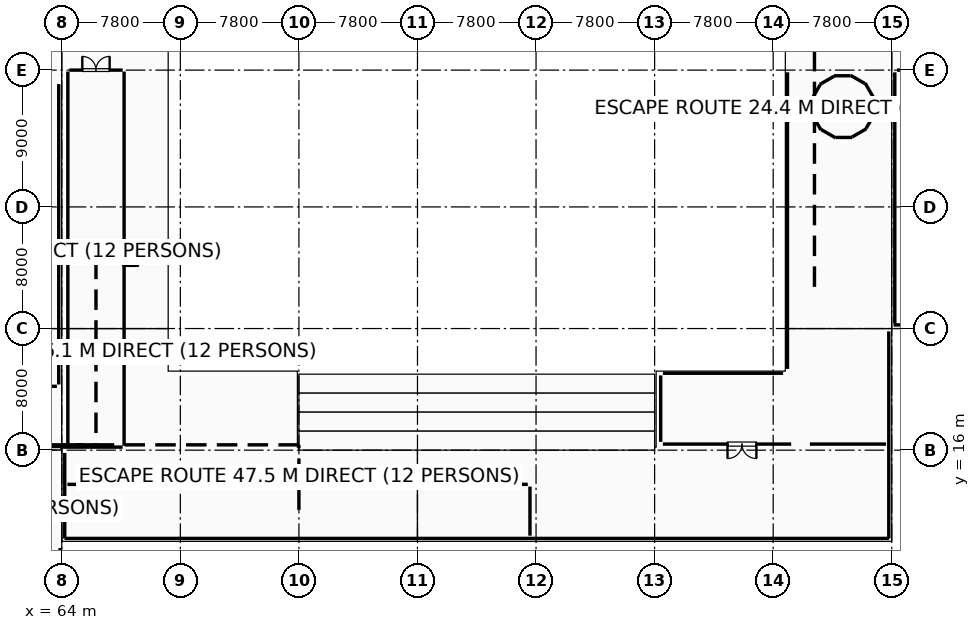
"""IFC4 building model, lengths in metres.
Left out: names, types, materials, properties, quantities, classifications, styles, units other than length and angle.
Written with IfcOpenShell. Run it as: python <this file> out.ifc"""

import sys

from ifc_helpers import new_model, si_unit, direction, frame, frame_2d, origin, origin_2d, place, context, subcontext, project, spatial, rectangle, extrude, element, fill, save


model = new_model("IFC4")
c1 = context("Model", 3, precision=1e-05, world=origin(), true_north=direction((0.0, 1.0)))
c2 = subcontext(c1, "Body", "Model", "MODEL_VIEW")
j1 = project(units=[si_unit("LENGTHUNIT", "METRE"), si_unit("PLANEANGLEUNIT", "RADIAN")], contexts=[c1])
p1 = place(None, origin())
s1 = spatial("IfcSite", under=j1, at=p1, CompositionType="ELEMENT")
p2 = place(p1, origin())
s2 = spatial("IfcBuilding", under=s1, at=p2, CompositionType="ELEMENT")
p3 = place(p2, frame((0.0, 0.0, 15.0)))
s3 = spatial("IfcBuildingStorey", under=s2, at=p3, CompositionType="ELEMENT", Elevation=15.0)
for number, where, z_axis, x_axis in (
    (1, (70.0, 16.0, 0.0), (0.0, 0.0, 1.0), (1.0, 0.0, 0.0)),
    (2, (70.0, 41.0, 0.0), (0.0, 0.0, 1.0), (1.0, 0.0, 0.0)),
):
    element("IfcColumn", number, at=place(p3, frame(where, z_axis=z_axis, x_axis=x_axis)), inside=s3, PredefinedType="COLUMN", context=c2, shape_type="SweptSolid", body=[
        extrude(rectangle(XDim=1.2, YDim=1.2, at=origin_2d()), origin(), (0.0, 0.0, 1.0), 4.8),
    ])
for number, where, z_axis, x_axis in (
    (3, (79.6, 16.0, 0.0), (0.0, 0.0, 1.0), (1.0, 0.0, 0.0)),
    (4, (79.6, 41.0, 0.0), (0.0, 0.0, 1.0), (1.0, 0.0, 0.0)),
    (5, (87.4, 16.0, 0.0), (0.0, 0.0, 1.0), (1.0, 0.0, 0.0)),
    (6, (87.4, 41.0, 0.0), (0.0, 0.0, 1.0), (1.0, 0.0, 0.0)),
    (7, (95.2, 16.0, 0.0), (0.0, 0.0, 1.0), (1.0, 0.0, 0.0)),
    (8, (95.2, 41.0, 0.0), (0.0, 0.0, 1.0), (1.0, 0.0, 0.0)),
    (9, (103.0, 16.0, 0.0), (0.0, 0.0, 1.0), (1.0, 0.0, 0.0)),
    (10, (103.0, 41.0, 0.0), (0.0, 0.0, 1.0), (1.0, 0.0, 0.0)),
):
    element("IfcColumn", number, at=place(p3, frame(where, z_axis=z_axis, x_axis=x_axis)), inside=s3, PredefinedType="COLUMN", context=c2, shape_type="SweptSolid", body=[
        extrude(rectangle(XDim=1.05, YDim=1.05, at=origin_2d()), origin(), (0.0, 0.0, 1.0), 4.8),
    ])
for number, where, z_axis, x_axis in (
    (11, (112.6, 16.0, 0.0), (0.0, 0.0, 1.0), (1.0, 0.0, 0.0)),
    (12, (112.6, 41.0, 0.0), (0.0, 0.0, 1.0), (1.0, 0.0, 0.0)),
):
    element("IfcColumn", number, at=place(p3, frame(where, z_axis=z_axis, x_axis=x_axis)), inside=s3, PredefinedType="COLUMN", context=c2, shape_type="SweptSolid", body=[
        extrude(rectangle(XDim=1.2, YDim=1.2, at=origin_2d()), origin(), (0.0, 0.0, 1.0), 4.8),
    ])
p4 = place(p3, frame((126.015, 24.24, 0.0), z_axis=(0.0, 0.0, 1.0), x_axis=(-1.0, 0.0, 0.0)))
e13 = element("IfcWall", 13, at=p4, inside=s3, PredefinedType="PARAPET", context=c2, shape_type="SweptSolid", body=[
    extrude(rectangle(XDim=7.295, YDim=0.18, at=frame_2d((3.647, 0.0))), origin(), (0.0, 0.0, 1.0), 0.88),
])
p5 = place(p3, frame((118.405, 23.815, 0.0), z_axis=(0.0, 0.0, 1.0), x_axis=(0.0, -1.0, 0.0)))
e14 = element("IfcWall", 14, at=p5, inside=s3, PredefinedType="STANDARD", context=c2, shape_type="SweptSolid", body=[
    extrude(rectangle(XDim=13.63, YDim=0.35, at=frame_2d((6.815, 0.0))), origin(), (0.0, 0.0, 1.0), 3.735),
])
p6 = place(p3, frame((118.415, 10.195, 0.0), z_axis=(0.0, 0.0, 1.0), x_axis=(-1.0, 0.0, 0.0)))
e15 = element("IfcWall", 15, at=p6, inside=s3, PredefinedType="STANDARD", context=c2, shape_type="SweptSolid", body=[
    extrude(rectangle(XDim=54.23, YDim=0.35, at=frame_2d((27.115, 0.0))), origin(), (0.0, 0.0, 1.0), 3.735),
])
p7 = place(p3, frame((64.195, 10.185, 0.0), z_axis=(0.0, 0.0, 1.0), x_axis=(0.0, 1.0, 0.0)))
e16 = element("IfcWall", 16, at=p7, inside=s3, PredefinedType="STANDARD", context=c2, shape_type="SweptSolid", body=[
    extrude(rectangle(XDim=5.63, YDim=0.35, at=frame_2d((2.815, 0.0))), origin(), (0.0, 0.0, 1.0), 3.735),
])
p8 = place(p3, frame((63.88, 16.24, 0.0), z_axis=(0.0, 0.0, 1.0), x_axis=(-1.0, 0.0, 0.0)))
e17 = element("IfcWall", 17, at=p8, inside=s3, PredefinedType="PARAPET", context=c2, shape_type="SweptSolid", body=[
    extrude(rectangle(XDim=7.495, YDim=0.18, at=frame_2d((3.748, 0.0))), origin(), (0.0, 0.0, 1.0), 0.88),
])
p9 = place(p3, frame((63.89, 9.564, 0.0), z_axis=(0.0, 0.0, 1.0), x_axis=(0.0, -1.0, 0.0)))
e18 = element("IfcWall", 18, at=p9, inside=s3, PredefinedType="PARAPET", context=c2, shape_type="SweptSolid", body=[
    extrude(rectangle(XDim=1.434, YDim=0.18, at=frame_2d((0.717, 0.0))), origin(), (0.0, 0.0, 1.0), 1.15),
])
p10 = place(p3, frame((117.461, 39.086, 0.0), z_axis=(0.0, 0.0, 1.0), x_axis=(-0.500080723117, 0.865978793255, 0.0)))
e19 = element("IfcWall", 19, at=p10, inside=s3, PredefinedType="SHEAR", context=c2, shape_type="SweptSolid", body=[
    extrude(rectangle(XDim=1.219, YDim=0.35, at=frame_2d((0.609, 0.0))), origin(), (0.0, 0.0, 1.0), 4.55),
])
for number, where, z_axis, x_axis in (
    (20, (116.833, 40.115, 0.0), (0.0, 0.0, 1.0), (-0.866, 0.5, 0.0)),
    (21, (115.884, 40.628, 0.0), (0.0, 0.0, 1.0), (-1.0, 0.0, 0.0)),
    (22, (114.804, 40.598, 0.0), (0.0, 0.0, 1.0), (-0.866, -0.5, 0.0)),
    (23, (113.885, 40.033, 0.0), (0.0, 0.0, 1.0), (-0.5, -0.866, 0.0)),
    (24, (113.372, 39.083, 0.0), (0.0, 0.0, 1.0), (0.0, -1.0, 0.0)),
    (25, (113.402, 38.004, 0.0), (0.0, 0.0, 1.0), (0.5, -0.866, 0.0)),
    (26, (113.967, 37.085, 0.0), (0.0, 0.0, 1.0), (0.866, -0.5, 0.0)),
    (27, (114.917, 36.572, 0.0), (0.0, 0.0, 1.0), (1.0, 0.0, 0.0)),
    (28, (115.996, 36.602, 0.0), (0.0, 0.0, 1.0), (0.866, 0.5, 0.0)),
    (29, (116.915, 37.167, 0.0), (0.0, 0.0, 1.0), (0.5, 0.866, 0.0)),
):
    element("IfcWall", number, at=place(p3, frame(where, z_axis=z_axis, x_axis=x_axis)), inside=s3, PredefinedType="SHEAR", context=c2, shape_type="SweptSolid", body=[
        extrude(rectangle(XDim=1.093, YDim=0.35, at=frame_2d((0.546, 0.0))), origin(), (0.0, 0.0, 1.0), 4.55),
    ])
p11 = place(p3, frame((117.428, 38.116, 0.0), z_axis=(0.0, 0.0, 1.0), x_axis=(0.0, 1.0, 0.0)))
e30 = element("IfcWall", 30, at=p11, inside=s3, PredefinedType="SHEAR", context=c2, shape_type="SweptSolid", body=[
    extrude(rectangle(XDim=0.967, YDim=0.35, at=frame_2d((0.483, 0.0))), origin(), (0.0, 0.0, 1.0), 4.55),
])
p12 = place(p3, frame((118.226, 16.4, 0.0), z_axis=(0.0, 0.0, 1.0), x_axis=(-1.0, 0.0, 0.0)))
e31 = element("IfcWall", 31, at=p12, inside=s3, PredefinedType="PARTITIONING", context=c2, shape_type="SweptSolid", body=[
    extrude(rectangle(XDim=5.011, YDim=0.25, at=frame_2d((2.505, 0.0))), origin(), (0.0, 0.0, 1.0), 4.54),
])
p13 = place(p3, frame((111.985, 16.4, 0.0), z_axis=(0.0, 0.0, 1.0), x_axis=(-1.0, 0.0, 0.0)))
e32 = element("IfcWall", 32, at=p13, inside=s3, PredefinedType="PARTITIONING", context=c2, shape_type="SweptSolid", body=[
    extrude(rectangle(XDim=8.44, YDim=0.25, at=frame_2d((4.22, 0.0))), origin(), (0.0, 0.0, 1.0), 3.68),
])
p14 = place(p13, frame((2.289, 0.0, 0.0)))
e33 = element("IfcOpeningElement", 33, at=p14, cuts=e32, PredefinedType="OPENING", context=c2, shape_type="SweptSolid", body=[
    extrude(rectangle(XDim=1.9, YDim=2.35, at=frame_2d((0.95, 1.175))), frame((0.0, 0.135, 0.0), z_axis=(0.0, -1.0, 0.0), x_axis=(1.0, 0.0, 0.0)), (0.0, 0.0, 1.0), 0.27),
])
p15 = place(p3, frame((103.4, 16.545, 0.0), z_axis=(0.0, 0.0, 1.0), x_axis=(0.0, 1.0, 0.0)))
e34 = element("IfcWall", 34, at=p15, inside=s3, PredefinedType="PARTITIONING", context=c2, shape_type="SweptSolid", body=[
    extrude(rectangle(XDim=4.37, YDim=0.25, at=frame_2d((2.185, 0.0))), origin(), (0.0, 0.0, 1.0), 4.54),
])
p16 = place(p3, frame((103.545, 21.06, 0.0), z_axis=(0.0, 0.0, 1.0), x_axis=(1.0, 0.0, 0.0)))
e35 = element("IfcWall", 35, at=p16, inside=s3, PredefinedType="PARTITIONING", context=c2, shape_type="SweptSolid", body=[
    extrude(rectangle(XDim=7.91, YDim=0.25, at=frame_2d((3.955, 0.0))), origin(), (0.0, 0.0, 1.0), 4.54),
])
p17 = place(p3, frame((111.74, 21.345, 0.0), z_axis=(0.0, 0.0, 1.0), x_axis=(0.0, 1.0, 0.0)))
e36 = element("IfcWall", 36, at=p17, inside=s3, PredefinedType="PARTITIONING", context=c2, shape_type="SweptSolid", body=[
    extrude(rectangle(XDim=19.51, YDim=0.25, at=frame_2d((9.755, 0.0))), origin(), (0.0, 0.0, 1.0), 4.54),
])
p18 = place(p3, frame((94.8, 13.605, 0.0), z_axis=(0.0, 0.0, 1.0), x_axis=(0.0, -1.0, 0.0)))
e37 = element("IfcWall", 37, at=p18, inside=s3, PredefinedType="PARTITIONING", context=c2, shape_type="SweptSolid", body=[
    extrude(rectangle(XDim=3.231, YDim=0.25, at=frame_2d((1.615, 0.0))), origin(), (0.0, 0.0, 1.0), 4.54),
])
p19 = place(p3, frame((64.374, 13.75, 0.0), z_axis=(0.0, 0.0, 1.0), x_axis=(1.0, 0.0, 0.0)))
e38 = element("IfcWall", 38, at=p19, inside=s3, PredefinedType="PARTITIONING", context=c2, shape_type="SweptSolid", body=[
    extrude(rectangle(XDim=30.281, YDim=0.25, at=frame_2d((15.141, 0.0))), origin(), (0.0, 0.0, 1.0), 4.54),
])
p20 = place(p19, frame((10.342, 0.0, 0.0)))
e39 = element("IfcOpeningElement", 39, at=p20, cuts=e38, PredefinedType="OPENING", context=c2, shape_type="SweptSolid", body=[
    extrude(rectangle(XDim=1.05, YDim=2.15, at=frame_2d((0.525, 1.075))), frame((0.0, 0.135, 0.0), z_axis=(0.0, -1.0, 0.0), x_axis=(1.0, 0.0, 0.0)), (0.0, 0.0, 1.0), 0.27),
])
p21 = place(p3, frame((68.1, 40.905, 0.0), z_axis=(0.0, 0.0, 1.0), x_axis=(0.0, -1.0, 0.0)))
e40 = element("IfcWall", 40, at=p21, inside=s3, PredefinedType="PARTITIONING", context=c2, shape_type="SweptSolid", body=[
    extrude(rectangle(XDim=24.61, YDim=0.15, at=frame_2d((12.305, 0.0))), origin(), (0.0, 0.0, 1.0), 4.54),
])
p22 = place(p21, frame((11.83, 0.0, 0.0)))
e41 = element("IfcOpeningElement", 41, at=p22, cuts=e40, PredefinedType="OPENING", context=c2, shape_type="SweptSolid", body=[
    extrude(rectangle(XDim=0.95, YDim=2.15, at=frame_2d((0.475, 1.075))), frame((0.0, 0.085, 0.0), z_axis=(0.0, -1.0, 0.0), x_axis=(1.0, 0.0, 0.0)), (0.0, 0.0, 1.0), 0.17),
])
p23 = place(p3, frame((68.005, 16.2, 0.0), z_axis=(0.0, 0.0, 1.0), x_axis=(-1.0, 0.0, 0.0)))
e42 = element("IfcWall", 42, at=p23, inside=s3, PredefinedType="PARTITIONING", context=c2, shape_type="SweptSolid", body=[
    extrude(rectangle(XDim=4.121, YDim=0.15, at=frame_2d((2.061, 0.0))), origin(), (0.0, 0.0, 1.0), 3.93),
])
p24 = place(p3, frame((64.4, 16.295, 0.0), z_axis=(0.0, 0.0, 1.0), x_axis=(0.0, 1.0, 0.0)))
e43 = element("IfcWall", 43, at=p24, inside=s3, PredefinedType="PARTITIONING", context=c2, shape_type="SweptSolid", body=[
    extrude(rectangle(XDim=24.61, YDim=0.15, at=frame_2d((12.305, 0.0))), origin(), (0.0, 0.0, 1.0), 3.73),
])
p25 = place(p3, frame((64.495, 41.0, 0.0), z_axis=(0.0, 0.0, 1.0), x_axis=(1.0, 0.0, 0.0)))
e44 = element("IfcWall", 44, at=p25, inside=s3, PredefinedType="PARTITIONING", context=c2, shape_type="SweptSolid", body=[
    extrude(rectangle(XDim=3.51, YDim=0.15, at=frame_2d((1.755, 0.0))), origin(), (0.0, 0.0, 1.0), 3.98),
])
p26 = place(p25, frame((0.855, 0.0, 0.0)))
e45 = element("IfcOpeningElement", 45, at=p26, cuts=e44, PredefinedType="OPENING", context=c2, shape_type="SweptSolid", body=[
    extrude(rectangle(XDim=1.8, YDim=2.15, at=frame_2d((0.9, 1.075))), frame((0.0, 0.085, 0.0), z_axis=(0.0, -1.0, 0.0), x_axis=(1.0, 0.0, 0.0)), (0.0, 0.0, 1.0), 0.17),
])
p27 = place(p3, frame((63.8, 40.08, 0.0), z_axis=(0.0, 0.0, 1.0), x_axis=(0.0, -1.0, 0.0)))
e46 = element("IfcWall", 46, at=p27, inside=s3, PredefinedType="PARTITIONING", context=c2, shape_type="SweptSolid", body=[
    extrude(rectangle(XDim=19.76, YDim=0.2, at=frame_2d((9.88, 0.0))), origin(), (0.0, 0.0, 1.0), 3.73),
])
p28 = place(p3, frame((63.68, 20.2, 0.0), z_axis=(0.0, 0.0, 1.0), x_axis=(-1.0, 0.0, 0.0)))
e47 = element("IfcWall", 47, at=p28, inside=s3, PredefinedType="PARTITIONING", context=c2, shape_type="SweptSolid", body=[
    extrude(rectangle(XDim=7.16, YDim=0.2, at=frame_2d((3.58, 0.0))), origin(), (0.0, 0.0, 1.0), 4.57),
])
p29 = place(p3, frame((118.945, 41.0, 0.0), z_axis=(0.0, 0.0, 1.0), x_axis=(1.0, 0.0, 0.0)))
e48 = element("IfcWall", 48, at=p29, inside=s3, PredefinedType="PARTITIONING", context=c2, shape_type="SweptSolid", body=[
    extrude(rectangle(XDim=7.065, YDim=0.25, at=frame_2d((3.532, 0.0))), origin(), (0.0, 0.0, 1.0), 3.87),
])
p30 = place(p29, frame((2.583, 0.0, 0.0)))
e49 = element("IfcOpeningElement", 49, at=p30, cuts=e48, PredefinedType="OPENING", context=c2, shape_type="SweptSolid", body=[
    extrude(rectangle(XDim=1.9, YDim=2.35, at=frame_2d((0.95, 1.175))), frame((0.0, 0.135, 0.0), z_axis=(0.0, -1.0, 0.0), x_axis=(1.0, 0.0, 0.0)), (0.0, 0.0, 1.0), 0.27),
])
p31 = place(p3, frame((118.8, 24.334, 0.0), z_axis=(0.0, 0.0, 1.0), x_axis=(0.0, 1.0, 0.0)))
e50 = element("IfcWall", 50, at=p31, inside=s3, PredefinedType="PARTITIONING", context=c2, shape_type="SweptSolid", body=[
    extrude(rectangle(XDim=16.521, YDim=0.25, at=frame_2d((8.26, 0.0))), origin(), (0.0, 0.0, 1.0), 3.73),
])
p32 = place(p14, origin())
e51 = element("IfcDoor", 51, at=p32, inside=s3, OperationType="DOUBLE_SWING_RIGHT", PredefinedType="DOOR", context=c2, shape_type="SweptSolid", body=[
    extrude(rectangle(XDim=1.9, YDim=2.35, at=frame_2d((0.95, 1.175))), frame((0.0, 0.025, 0.0), z_axis=(0.0, -1.0, 0.0), x_axis=(1.0, 0.0, 0.0)), (0.0, 0.0, 1.0), 0.05),
])
fill(e33, e51)
p33 = place(p20, origin())
e52 = element("IfcDoor", 52, at=p33, inside=s3, OperationType="SINGLE_SWING_LEFT", PredefinedType="DOOR", context=c2, shape_type="SweptSolid", body=[
    extrude(rectangle(XDim=1.05, YDim=2.15, at=frame_2d((0.525, 1.075))), frame((0.0, 0.025, 0.0), z_axis=(0.0, -1.0, 0.0), x_axis=(1.0, 0.0, 0.0)), (0.0, 0.0, 1.0), 0.05),
])
fill(e39, e52)
p34 = place(p22, origin())
e53 = element("IfcDoor", 53, at=p34, inside=s3, OperationType="SINGLE_SWING_RIGHT", PredefinedType="DOOR", context=c2, shape_type="SweptSolid", body=[
    extrude(rectangle(XDim=0.95, YDim=2.15, at=frame_2d((0.475, 1.075))), frame((0.0, 0.025, 0.0), z_axis=(0.0, -1.0, 0.0), x_axis=(1.0, 0.0, 0.0)), (0.0, 0.0, 1.0), 0.05),
])
fill(e41, e53)
p35 = place(p26, origin())
e54 = element("IfcDoor", 54, at=p35, inside=s3, OperationType="DOUBLE_DOOR_SINGLE_SWING", PredefinedType="DOOR", context=c2, shape_type="SweptSolid", body=[
    extrude(rectangle(XDim=1.8, YDim=2.15, at=frame_2d((0.9, 1.075))), frame((0.0, 0.025, 0.0), z_axis=(0.0, -1.0, 0.0), x_axis=(1.0, 0.0, 0.0)), (0.0, 0.0, 1.0), 0.05),
])
fill(e45, e54)
save(model, sys.argv[1])
